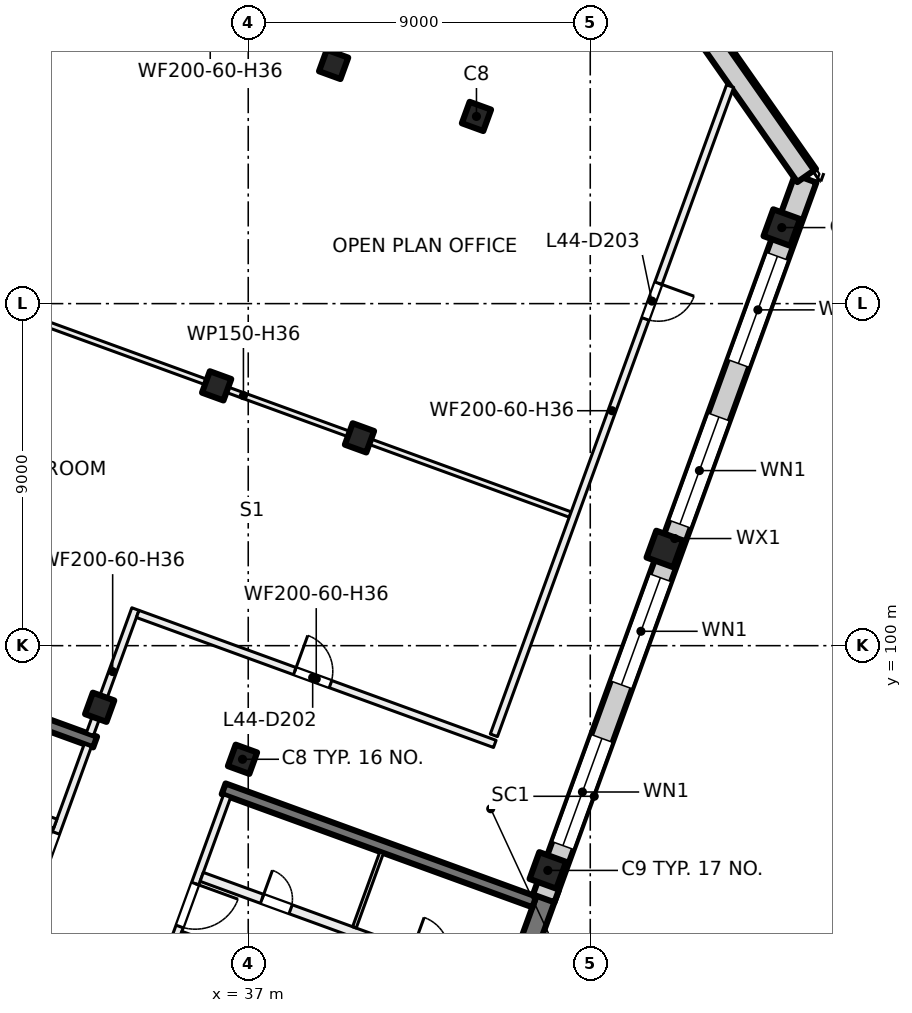
"""IFC4 building model, lengths in metres.
Left out: names, types, materials, properties, quantities, classifications, styles, units other than length and angle.
Written with IfcOpenShell. Run it as: python <this file> out.ifc"""

import sys

from ifc_helpers import new_model, si_unit, direction, frame, frame_2d, origin, origin_2d, place, context, subcontext, project, spatial, rectangle, extrude, element, fill, save


model = new_model("IFC4")
c1 = context("Model", 3, precision=1e-05, world=origin(), true_north=direction((0.0, 1.0)))
c2 = subcontext(c1, "Body", "Model", "MODEL_VIEW")
j1 = project(units=[si_unit("LENGTHUNIT", "METRE"), si_unit("PLANEANGLEUNIT", "RADIAN")], contexts=[c1])
p1 = place(None, origin())
s1 = spatial("IfcSite", under=j1, at=p1, CompositionType="ELEMENT")
p2 = place(p1, origin())
s2 = spatial("IfcBuilding", under=s1, at=p2, CompositionType="ELEMENT")
p3 = place(p2, frame((0.0, 0.0, 188.0)))
s3 = spatial("IfcBuildingStorey", under=s2, at=p3, CompositionType="ELEMENT", Elevation=188.0)
for number, where, z_axis, x_axis in (
    (1, (43.006, 113.925, 0.0), (0.0, 0.0, 1.0), (-0.342, -0.94, 0.0)),
    (2, (39.927, 105.468, 0.0), (0.0, 0.0, 1.0), (-0.342, -0.94, 0.0)),
    (3, (36.849, 97.011, 0.0), (0.0, 0.0, 1.0), (-0.342, -0.94, 0.0)),
    (4, (39.247, 115.293, 0.0), (0.0, 0.0, 1.0), (-0.342, -0.94, 0.0)),
    (5, (36.169, 106.836, 0.0), (0.0, 0.0, 1.0), (-0.342, -0.94, 0.0)),
    (6, (33.091, 98.379, 0.0), (0.0, 0.0, 1.0), (-0.342, -0.94, 0.0)),
):
    element("IfcColumn", number, at=place(p3, frame(where, z_axis=z_axis, x_axis=x_axis)), inside=s3, PredefinedType="COLUMN", context=c2, shape_type="SweptSolid", body=[
        extrude(rectangle(XDim=0.6, YDim=0.6, at=origin_2d()), origin(), (0.0, 0.0, 1.0), 4.0),
    ])
for number, where, z_axis, x_axis in (
    (7, (51.04, 111.001, 0.0), (0.0, 0.0, 1.0), (-0.342, -0.94, 0.0)),
    (8, (47.962, 102.544, 0.0), (0.0, 0.0, 1.0), (-0.342, -0.94, 0.0)),
    (9, (44.884, 94.087, 0.0), (0.0, 0.0, 1.0), (-0.342, -0.94, 0.0)),
):
    element("IfcColumn", number, at=place(p3, frame(where, z_axis=z_axis, x_axis=x_axis)), inside=s3, PredefinedType="COLUMN", context=c2, shape_type="SweptSolid", body=[
        extrude(rectangle(XDim=0.75, YDim=0.75, at=origin_2d()), origin(), (0.0, 0.0, 1.0), 4.0),
    ])
p4 = place(p3, frame((41.874, 85.232, 0.0), z_axis=(0.0, 0.0, 1.0), x_axis=(0.342020437038, 0.939692513883, 0.0)))
e10 = element("IfcWall", 10, at=p4, inside=s3, PredefinedType="SHEAR", context=c2, shape_type="SweptSolid", body=[
    extrude(rectangle(XDim=8.975, YDim=0.5, at=frame_2d((4.487, 0.0))), origin(), (0.0, 0.0, 1.0), 4.0),
])
p5 = place(p3, frame((44.529, 93.258, 0.0), z_axis=(0.0, 0.0, 1.0), x_axis=(-0.9396917844, 0.342022441267, 0.0)))
e11 = element("IfcWall", 11, at=p5, inside=s3, PredefinedType="SHEAR", context=c2, shape_type="SweptSolid", body=[
    extrude(rectangle(XDim=8.7, YDim=0.3, at=frame_2d((4.35, 0.0))), origin(), (0.0, 0.0, 1.0), 4.0),
])
p6 = place(p3, frame((32.971, 97.465, 0.0), z_axis=(0.0, 0.0, 1.0), x_axis=(-0.939695066972, 0.34201342241, 0.0)))
e12 = element("IfcWall", 12, at=p6, inside=s3, PredefinedType="SHEAR", context=c2, shape_type="SweptSolid", body=[
    extrude(rectangle(XDim=8.7, YDim=0.3, at=frame_2d((4.35, 0.0))), origin(), (0.0, 0.0, 1.0), 4.0),
])
p7 = place(p3, frame((51.668, 112.289, 0.0), z_axis=(0.0, 0.0, 1.0), x_axis=(-0.342020240414, -0.939692585449, 0.0)))
e13 = element("IfcWall", 13, at=p7, inside=s3, PredefinedType="SOLIDWALL", context=c2, shape_type="SweptSolid", body=[
    extrude(rectangle(XDim=20.155, YDim=0.6, at=frame_2d((10.077, 0.0))), origin(), (0.0, 0.0, 1.0), 3.625),
])
p8 = place(p7, frame((2.175, 0.0, 0.9)))
e14 = element("IfcOpeningElement", 14, at=p8, cuts=e13, PredefinedType="OPENING", context=c2, shape_type="SweptSolid", body=[
    extrude(rectangle(XDim=3.0, YDim=2.4, at=frame_2d((1.5, 1.2))), frame((0.0, 0.31, 0.0), z_axis=(0.0, -1.0, 0.0), x_axis=(1.0, 0.0, 0.0)), (0.0, 0.0, 1.0), 0.62),
])
p9 = place(p7, frame((6.675, 0.0, 0.9)))
e15 = element("IfcOpeningElement", 15, at=p9, cuts=e13, PredefinedType="OPENING", context=c2, shape_type="SweptSolid", body=[
    extrude(rectangle(XDim=3.0, YDim=2.4, at=frame_2d((1.5, 1.2))), frame((0.0, 0.31, 0.0), z_axis=(0.0, -1.0, 0.0), x_axis=(1.0, 0.0, 0.0)), (0.0, 0.0, 1.0), 0.62),
])
p10 = place(p7, frame((11.175, 0.0, 0.9)))
e16 = element("IfcOpeningElement", 16, at=p10, cuts=e13, PredefinedType="OPENING", context=c2, shape_type="SweptSolid", body=[
    extrude(rectangle(XDim=3.0, YDim=2.4, at=frame_2d((1.5, 1.2))), frame((0.0, 0.31, 0.0), z_axis=(0.0, -1.0, 0.0), x_axis=(1.0, 0.0, 0.0)), (0.0, 0.0, 1.0), 0.62),
])
p11 = place(p7, frame((15.675, 0.0, 0.9)))
e17 = element("IfcOpeningElement", 17, at=p11, cuts=e13, PredefinedType="OPENING", context=c2, shape_type="SweptSolid", body=[
    extrude(rectangle(XDim=3.0, YDim=2.4, at=frame_2d((1.5, 1.2))), frame((0.0, 0.31, 0.0), z_axis=(0.0, -1.0, 0.0), x_axis=(1.0, 0.0, 0.0)), (0.0, 0.0, 1.0), 0.62),
])
p12 = place(p3, frame((36.657, 133.847, 0.0), z_axis=(0.0, 0.0, 1.0), x_axis=(0.573575458379, -0.819152729072, 0.0)))
e18 = element("IfcWall", 18, at=p12, inside=s3, PredefinedType="SOLIDWALL", context=c2, shape_type="SweptSolid", body=[
    extrude(rectangle(XDim=26.218, YDim=0.6, at=frame_2d((13.109, 0.0))), origin(), (0.0, 0.0, 1.0), 3.625),
])
p13 = place(p3, frame((24.666, 100.669, 0.0), z_axis=(0.0, 0.0, 1.0), x_axis=(0.34201964167, 0.939692803373, 0.0)))
e19 = element("IfcWall", 19, at=p13, inside=s3, PredefinedType="SOLIDWALL", context=c2, shape_type="SweptSolid", body=[
    extrude(rectangle(XDim=32.884, YDim=0.6, at=frame_2d((16.442, 0.0))), origin(), (0.0, 0.0, 1.0), 3.625),
])
p14 = place(p13, frame((1.48, 0.0, 0.9)))
e20 = element("IfcOpeningElement", 20, at=p14, cuts=e19, PredefinedType="OPENING", context=c2, shape_type="SweptSolid", body=[
    extrude(rectangle(XDim=3.0, YDim=2.4, at=frame_2d((1.5, 1.2))), frame((0.0, 0.31, 0.0), z_axis=(0.0, -1.0, 0.0), x_axis=(1.0, 0.0, 0.0)), (0.0, 0.0, 1.0), 0.62),
])
p15 = place(p13, frame((5.98, 0.0, 0.9)))
e21 = element("IfcOpeningElement", 21, at=p15, cuts=e19, PredefinedType="OPENING", context=c2, shape_type="SweptSolid", body=[
    extrude(rectangle(XDim=3.0, YDim=2.4, at=frame_2d((1.5, 1.2))), frame((0.0, 0.31, 0.0), z_axis=(0.0, -1.0, 0.0), x_axis=(1.0, 0.0, 0.0)), (0.0, 0.0, 1.0), 0.62),
])
p16 = place(p13, frame((10.48, 0.0, 0.9)))
e22 = element("IfcOpeningElement", 22, at=p16, cuts=e19, PredefinedType="OPENING", context=c2, shape_type="SweptSolid", body=[
    extrude(rectangle(XDim=3.0, YDim=2.4, at=frame_2d((1.5, 1.2))), frame((0.0, 0.31, 0.0), z_axis=(0.0, -1.0, 0.0), x_axis=(1.0, 0.0, 0.0)), (0.0, 0.0, 1.0), 0.62),
])
p17 = place(p13, frame((14.98, 0.0, 0.9)))
e23 = element("IfcOpeningElement", 23, at=p17, cuts=e19, PredefinedType="OPENING", context=c2, shape_type="SweptSolid", body=[
    extrude(rectangle(XDim=3.0, YDim=2.4, at=frame_2d((1.5, 1.2))), frame((0.0, 0.31, 0.0), z_axis=(0.0, -1.0, 0.0), x_axis=(1.0, 0.0, 0.0)), (0.0, 0.0, 1.0), 0.62),
])
p18 = place(p13, frame((19.48, 0.0, 0.9)))
e24 = element("IfcOpeningElement", 24, at=p18, cuts=e19, PredefinedType="OPENING", context=c2, shape_type="SweptSolid", body=[
    extrude(rectangle(XDim=3.0, YDim=2.4, at=frame_2d((1.5, 1.2))), frame((0.0, 0.31, 0.0), z_axis=(0.0, -1.0, 0.0), x_axis=(1.0, 0.0, 0.0)), (0.0, 0.0, 1.0), 0.62),
])
p19 = place(p13, frame((23.98, 0.0, 0.9)))
e25 = element("IfcOpeningElement", 25, at=p19, cuts=e19, PredefinedType="OPENING", context=c2, shape_type="SweptSolid", body=[
    extrude(rectangle(XDim=3.0, YDim=2.4, at=frame_2d((1.5, 1.2))), frame((0.0, 0.31, 0.0), z_axis=(0.0, -1.0, 0.0), x_axis=(1.0, 0.0, 0.0)), (0.0, 0.0, 1.0), 0.62),
])
p20 = place(p13, frame((28.48, 0.0, 0.9)))
e26 = element("IfcOpeningElement", 26, at=p20, cuts=e19, PredefinedType="OPENING", context=c2, shape_type="SweptSolid", body=[
    extrude(rectangle(XDim=3.0, YDim=2.4, at=frame_2d((1.5, 1.2))), frame((0.0, 0.31, 0.0), z_axis=(0.0, -1.0, 0.0), x_axis=(1.0, 0.0, 0.0)), (0.0, 0.0, 1.0), 0.62),
])
p21 = place(p3, frame((31.427, 93.663, 0.0), z_axis=(0.0, 0.0, 1.0), x_axis=(0.342030870568, 0.93968871632, 0.0)))
e27 = element("IfcWall", 27, at=p21, inside=s3, PredefinedType="PARTITIONING", context=c2, shape_type="SweptSolid", body=[
    extrude(rectangle(XDim=3.95, YDim=0.2, at=frame_2d((1.975, 0.0))), origin(), (0.0, 0.0, 1.0), 3.625),
])
p22 = place(p21, frame((0.3, 0.0, 0.0)))
e28 = element("IfcOpeningElement", 28, at=p22, cuts=e27, PredefinedType="OPENING", context=c2, shape_type="SweptSolid", body=[
    extrude(rectangle(XDim=1.2, YDim=2.1, at=frame_2d((0.6, 1.05))), frame((0.0, 0.11, 0.0), z_axis=(0.0, -1.0, 0.0), x_axis=(1.0, 0.0, 0.0)), (0.0, 0.0, 1.0), 0.22),
])
p23 = place(p3, frame((23.983, 98.208, 0.0), z_axis=(0.0, 0.0, 1.0), x_axis=(0.939699751196, -0.342000552051, 0.0)))
e29 = element("IfcWall", 29, at=p23, inside=s3, PredefinedType="PARTITIONING", context=c2, shape_type="SweptSolid", body=[
    extrude(rectangle(XDim=8.45, YDim=0.25, at=frame_2d((4.225, 0.0))), origin(), (0.0, 0.0, 1.0), 3.625),
])
p24 = place(p23, frame((5.86, 0.0, 0.0)))
e30 = element("IfcOpeningElement", 30, at=p24, cuts=e29, PredefinedType="OPENING", context=c2, shape_type="SweptSolid", body=[
    extrude(rectangle(XDim=1.0, YDim=2.1, at=frame_2d((0.5, 1.05))), frame((0.0, 0.135, 0.0), z_axis=(0.0, -1.0, 0.0), x_axis=(1.0, 0.0, 0.0)), (0.0, 0.0, 1.0), 0.27),
])
p25 = place(p23, frame((1.685, 0.0, 0.0)))
e31 = element("IfcOpeningElement", 31, at=p25, cuts=e29, PredefinedType="OPENING", context=c2, shape_type="SweptSolid", body=[
    extrude(rectangle(XDim=0.8, YDim=2.1, at=frame_2d((0.4, 1.05))), frame((0.0, 0.135, 0.0), z_axis=(0.0, -1.0, 0.0), x_axis=(1.0, 0.0, 0.0)), (0.0, 0.0, 1.0), 0.27),
])
p26 = place(p3, frame((36.443, 96.041, 0.0), z_axis=(0.0, 0.0, 1.0), x_axis=(-0.341996156931, -0.939701350773, 0.0)))
e32 = element("IfcWall", 32, at=p26, inside=s3, PredefinedType="PARTITIONING", context=c2, shape_type="SweptSolid", body=[
    extrude(rectangle(XDim=3.95, YDim=0.2, at=frame_2d((1.975, 0.0))), origin(), (0.0, 0.0, 1.0), 3.625),
])
p27 = place(p26, frame((2.45, 0.0, 0.0)))
e33 = element("IfcOpeningElement", 33, at=p27, cuts=e32, PredefinedType="OPENING", context=c2, shape_type="SweptSolid", body=[
    extrude(rectangle(XDim=1.2, YDim=2.1, at=frame_2d((0.6, 1.05))), frame((0.0, 0.11, 0.0), z_axis=(0.0, -1.0, 0.0), x_axis=(1.0, 0.0, 0.0)), (0.0, 0.0, 1.0), 0.22),
])
p28 = place(p3, frame((35.22, 92.389, 0.0), z_axis=(0.0, 0.0, 1.0), x_axis=(0.939690465531, -0.342026064782, 0.0)))
e34 = element("IfcWall", 34, at=p28, inside=s3, PredefinedType="PARTITIONING", context=c2, shape_type="SweptSolid", body=[
    extrude(rectangle(XDim=8.45, YDim=0.2, at=frame_2d((4.225, 0.0))), origin(), (0.0, 0.0, 1.0), 3.625),
])
p29 = place(p28, frame((5.225, 0.0, 0.0)))
e35 = element("IfcOpeningElement", 35, at=p29, cuts=e34, PredefinedType="OPENING", context=c2, shape_type="SweptSolid", body=[
    extrude(rectangle(XDim=1.5, YDim=2.1, at=frame_2d((0.75, 1.05))), frame((0.0, 0.11, 0.0), z_axis=(0.0, -1.0, 0.0), x_axis=(1.0, 0.0, 0.0)), (0.0, 0.0, 1.0), 0.22),
])
p30 = place(p3, frame((35.776, 93.916, 0.0), z_axis=(0.0, 0.0, 1.0), x_axis=(0.939690465531, -0.342026064782, 0.0)))
e36 = element("IfcWall", 36, at=p30, inside=s3, PredefinedType="PARTITIONING", context=c2, shape_type="SweptSolid", body=[
    extrude(rectangle(XDim=8.45, YDim=0.25, at=frame_2d((4.225, 0.0))), origin(), (0.0, 0.0, 1.0), 3.625),
])
p31 = place(p30, frame((1.69, 0.0, 0.0)))
e37 = element("IfcOpeningElement", 37, at=p31, cuts=e36, PredefinedType="OPENING", context=c2, shape_type="SweptSolid", body=[
    extrude(rectangle(XDim=0.8, YDim=2.1, at=frame_2d((0.4, 1.05))), frame((0.0, 0.135, 0.0), z_axis=(0.0, -1.0, 0.0), x_axis=(1.0, 0.0, 0.0)), (0.0, 0.0, 1.0), 0.27),
])
p32 = place(p30, frame((5.865, 0.0, 0.0)))
e38 = element("IfcOpeningElement", 38, at=p32, cuts=e36, PredefinedType="OPENING", context=c2, shape_type="SweptSolid", body=[
    extrude(rectangle(XDim=1.0, YDim=2.1, at=frame_2d((0.5, 1.05))), frame((0.0, 0.135, 0.0), z_axis=(0.0, -1.0, 0.0), x_axis=(1.0, 0.0, 0.0)), (0.0, 0.0, 1.0), 0.27),
])
p33 = place(p3, frame((40.512, 94.56, 0.0), z_axis=(0.0, 0.0, 1.0), x_axis=(-0.342023078919, -0.939691552312, 0.0)))
e39 = element("IfcWall", 39, at=p33, inside=s3, PredefinedType="PARTITIONING", context=c2, shape_type="SweptSolid", body=[
    extrude(rectangle(XDim=2.1, YDim=0.1, at=frame_2d((1.05, 0.0))), origin(), (0.0, 0.0, 1.0), 3.625),
])
p34 = place(p3, frame((28.275, 109.709, 0.0), z_axis=(0.0, 0.0, 1.0), x_axis=(0.939695619185, -0.342011905181, 0.0)))
e40 = element("IfcWall", 40, at=p34, inside=s3, PredefinedType="PARTITIONING", context=c2, shape_type="SweptSolid", body=[
    extrude(rectangle(XDim=18.301, YDim=0.15, at=frame_2d((9.15, 0.0))), origin(), (0.0, 0.0, 1.0), 3.625),
])
p35 = place(p3, frame((32.834, 97.674, 0.0), z_axis=(0.0, 0.0, 1.0), x_axis=(0.342017493073, 0.939693585395, 0.0)))
e41 = element("IfcWall", 41, at=p35, inside=s3, PredefinedType="PARTITIONING", context=c2, shape_type="SweptSolid", body=[
    extrude(rectangle(XDim=3.5, YDim=0.2, at=frame_2d((1.75, 0.0))), origin(), (0.0, 0.0, 1.0), 3.625),
])
p36 = place(p3, frame((34.091, 100.835, 0.0), z_axis=(0.0, 0.0, 1.0), x_axis=(0.939702148643, -0.341993964619, 0.0)))
e42 = element("IfcWall", 42, at=p36, inside=s3, PredefinedType="PARTITIONING", context=c2, shape_type="SweptSolid", body=[
    extrude(rectangle(XDim=10.0, YDim=0.2, at=frame_2d((5.0, 0.0))), origin(), (0.0, 0.0, 1.0), 3.625),
])
p37 = place(p36, frame((4.4, 0.0, 0.0)))
e43 = element("IfcOpeningElement", 43, at=p37, cuts=e42, PredefinedType="OPENING", context=c2, shape_type="SweptSolid", body=[
    extrude(rectangle(XDim=1.0, YDim=2.1, at=frame_2d((0.5, 1.05))), frame((0.0, 0.11, 0.0), z_axis=(0.0, -1.0, 0.0), x_axis=(1.0, 0.0, 0.0)), (0.0, 0.0, 1.0), 0.22),
])
p38 = place(p3, frame((43.464, 97.641, 0.0), z_axis=(0.0, 0.0, 1.0), x_axis=(0.341997546278, 0.939700845131, 0.0)))
e44 = element("IfcWall", 44, at=p38, inside=s3, PredefinedType="PARTITIONING", context=c2, shape_type="SweptSolid", body=[
    extrude(rectangle(XDim=18.178, YDim=0.2, at=frame_2d((9.089, 0.0))), origin(), (0.0, 0.0, 1.0), 3.625),
])
p39 = place(p38, frame((11.659, 0.0, 0.0)))
e45 = element("IfcOpeningElement", 45, at=p39, cuts=e44, PredefinedType="OPENING", context=c2, shape_type="SweptSolid", body=[
    extrude(rectangle(XDim=1.0, YDim=2.1, at=frame_2d((0.5, 1.05))), frame((0.0, 0.11, 0.0), z_axis=(0.0, -1.0, 0.0), x_axis=(1.0, 0.0, 0.0)), (0.0, 0.0, 1.0), 0.22),
])
p40 = place(p8, origin())
e46 = element("IfcWindow", 46, at=p40, inside=s3, PartitioningType="SINGLE_PANEL", PredefinedType="WINDOW", context=c2, shape_type="SweptSolid", body=[
    extrude(rectangle(XDim=3.0, YDim=2.4, at=frame_2d((1.5, 1.2))), frame((0.0, 0.03, 0.0), z_axis=(0.0, -1.0, 0.0), x_axis=(1.0, 0.0, 0.0)), (0.0, 0.0, 1.0), 0.06),
])
fill(e14, e46)
p41 = place(p9, origin())
e47 = element("IfcWindow", 47, at=p41, inside=s3, PartitioningType="SINGLE_PANEL", PredefinedType="WINDOW", context=c2, shape_type="SweptSolid", body=[
    extrude(rectangle(XDim=3.0, YDim=2.4, at=frame_2d((1.5, 1.2))), frame((0.0, 0.03, 0.0), z_axis=(0.0, -1.0, 0.0), x_axis=(1.0, 0.0, 0.0)), (0.0, 0.0, 1.0), 0.06),
])
fill(e15, e47)
p42 = place(p10, origin())
e48 = element("IfcWindow", 48, at=p42, inside=s3, PartitioningType="SINGLE_PANEL", PredefinedType="WINDOW", context=c2, shape_type="SweptSolid", body=[
    extrude(rectangle(XDim=3.0, YDim=2.4, at=frame_2d((1.5, 1.2))), frame((0.0, 0.03, 0.0), z_axis=(0.0, -1.0, 0.0), x_axis=(1.0, 0.0, 0.0)), (0.0, 0.0, 1.0), 0.06),
])
fill(e16, e48)
p43 = place(p11, origin())
e49 = element("IfcWindow", 49, at=p43, inside=s3, PartitioningType="SINGLE_PANEL", PredefinedType="WINDOW", context=c2, shape_type="SweptSolid", body=[
    extrude(rectangle(XDim=3.0, YDim=2.4, at=frame_2d((1.5, 1.2))), frame((0.0, 0.03, 0.0), z_axis=(0.0, -1.0, 0.0), x_axis=(1.0, 0.0, 0.0)), (0.0, 0.0, 1.0), 0.06),
])
fill(e17, e49)
p44 = place(p22, origin())
e50 = element("IfcDoor", 50, at=p44, inside=s3, OperationType="DOUBLE_DOOR_SINGLE_SWING", PredefinedType="DOOR", context=c2, shape_type="SweptSolid", body=[
    extrude(rectangle(XDim=1.2, YDim=2.1, at=frame_2d((0.6, 1.05))), frame((0.0, 0.025, 0.0), z_axis=(0.0, -1.0, 0.0), x_axis=(1.0, 0.0, 0.0)), (0.0, 0.0, 1.0), 0.05),
])
fill(e28, e50)
p45 = place(p27, origin())
e51 = element("IfcDoor", 51, at=p45, inside=s3, OperationType="DOUBLE_DOOR_SINGLE_SWING", PredefinedType="DOOR", context=c2, shape_type="SweptSolid", body=[
    extrude(rectangle(XDim=1.2, YDim=2.1, at=frame_2d((0.6, 1.05))), frame((0.0, 0.025, 0.0), z_axis=(0.0, -1.0, 0.0), x_axis=(1.0, 0.0, 0.0)), (0.0, 0.0, 1.0), 0.05),
])
fill(e33, e51)
p46 = place(p31, origin())
e52 = element("IfcDoor", 52, at=p46, inside=s3, OperationType="SINGLE_SWING_RIGHT", PredefinedType="DOOR", context=c2, shape_type="SweptSolid", body=[
    extrude(rectangle(XDim=0.8, YDim=2.1, at=frame_2d((0.4, 1.05))), frame((0.0, 0.025, 0.0), z_axis=(0.0, -1.0, 0.0), x_axis=(1.0, 0.0, 0.0)), (0.0, 0.0, 1.0), 0.05),
])
fill(e37, e52)
p47 = place(p37, origin())
e53 = element("IfcDoor", 53, at=p47, inside=s3, OperationType="SINGLE_SWING_LEFT", PredefinedType="DOOR", context=c2, shape_type="SweptSolid", body=[
    extrude(rectangle(XDim=1.0, YDim=2.1, at=frame_2d((0.5, 1.05))), frame((0.0, 0.025, 0.0), z_axis=(0.0, -1.0, 0.0), x_axis=(1.0, 0.0, 0.0)), (0.0, 0.0, 1.0), 0.05),
])
fill(e43, e53)
p48 = place(p39, origin())
e54 = element("IfcDoor", 54, at=p48, inside=s3, OperationType="SINGLE_SWING_RIGHT", PredefinedType="DOOR", context=c2, shape_type="SweptSolid", body=[
    extrude(rectangle(XDim=1.0, YDim=2.1, at=frame_2d((0.5, 1.05))), frame((0.0, 0.025, 0.0), z_axis=(0.0, -1.0, 0.0), x_axis=(1.0, 0.0, 0.0)), (0.0, 0.0, 1.0), 0.05),
])
fill(e45, e54)
save(model, sys.argv[1])
